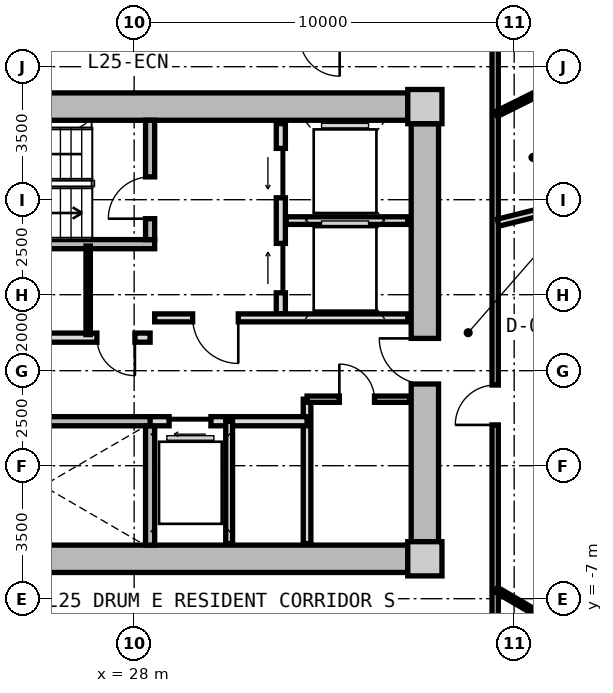
"""IFC4 building model, lengths in metres.
Left out: names, types, materials, properties, quantities, classifications, styles, units other than length and angle.
Written with IfcOpenShell. Run it as: python <this file> out.ifc"""

import sys

from ifc_helpers import new_model, si_unit, direction, frame, frame_2d, origin, origin_2d, place, context, subcontext, project, spatial, rectangle, extrude, source, transform, mapped, element, fill, save


model = new_model("IFC4")
c1 = context("Model", 3, precision=1e-05, world=origin(), true_north=direction((0.0, 1.0)))
c2 = subcontext(c1, "Body", "Model", "MODEL_VIEW")
j1 = project(units=[si_unit("LENGTHUNIT", "METRE"), si_unit("PLANEANGLEUNIT", "RADIAN")], contexts=[c1])
p1 = place(None, origin())
s1 = spatial("IfcSite", under=j1, at=p1, CompositionType="ELEMENT")
p2 = place(p1, origin())
s2 = spatial("IfcBuilding", under=s1, at=p2, CompositionType="ELEMENT")
p3 = place(p2, frame((0.0, 0.0, 84.05)))
s3 = spatial("IfcBuildingStorey", under=s2, at=p3, CompositionType="ELEMENT", Elevation=84.05)
m1 = source(origin(), c2, "Body", "SweptSolid", [
    extrude(rectangle(XDim=0.9, YDim=0.9, at=origin_2d()), origin(), (0.0, 0.0, 1.0), 3.05),
])
for number, where, z_axis, x_axis in (
    (1, (35.65, -5.95, 0.0), (0.0, 0.0, 1.0), (1.0, 0.0, 0.0)),
    (2, (35.65, 5.95, 0.0), (0.0, 0.0, 1.0), (1.0, 0.0, 0.0)),
):
    element("IfcColumn", number, at=place(p3, frame(where, z_axis=z_axis, x_axis=x_axis)), inside=s3, PredefinedType="COLUMN", context=c2, shape_type="MappedRepresentation", body=[
        mapped(m1, transform((0.0, 0.0, 0.0), x_axis=(1.0, 0.0, 0.0), y_axis=(0.0, 1.0, 0.0), z_axis=(0.0, 0.0, 1.0), scale=1.0)),
    ])
m2 = source(origin(), c2, "Body", "SweptSolid", [
    extrude(rectangle(XDim=14.4, YDim=0.72, at=frame_2d((7.2, 0.0))), origin(), (0.0, 0.0, 1.0), 2.79),
])
for number, where, z_axis, x_axis in (
    (3, (20.8, 5.95, 0.0), (0.0, 0.0, 1.0), (1.0, 0.0, 0.0)),
    (4, (35.2, -5.95, 0.0), (0.0, 0.0, 1.0), (-1.0, 0.0, 0.0)),
):
    element("IfcWall", number, at=place(p3, frame(where, z_axis=z_axis, x_axis=x_axis)), inside=s3, PredefinedType="SHEAR", context=c2, shape_type="MappedRepresentation", body=[
        mapped(m2, transform((0.0, 0.0, 0.0), x_axis=(1.0, 0.0, 0.0), y_axis=(0.0, 1.0, 0.0), z_axis=(0.0, 0.0, 1.0), scale=1.0)),
    ])
m3 = source(origin(), c2, "Body", "SweptSolid", [
    extrude(rectangle(XDim=11.0, YDim=0.72, at=frame_2d((5.5, 0.0))), origin(), (0.0, 0.0, 1.0), 2.79),
])
p4 = place(p3, frame((35.65, 5.5, 0.0), z_axis=(0.0, 0.0, 1.0), x_axis=(0.0, -1.0, 0.0)))
e5 = element("IfcWall", 5, at=p4, inside=s3, PredefinedType="SHEAR", context=c2, shape_type="MappedRepresentation", body=[
    mapped(m3, transform((0.0, 0.0, 0.0), x_axis=(1.0, 0.0, 0.0), y_axis=(0.0, 1.0, 0.0), z_axis=(0.0, 0.0, 1.0), scale=1.0)),
])
p5 = place(p4, frame((5.65, 0.0, 0.0)))
e6 = element("IfcOpeningElement", 6, at=p5, cuts=e5, PredefinedType="OPENING", context=c2, shape_type="SweptSolid", body=[
    extrude(rectangle(XDim=1.2, YDim=2.15, at=frame_2d((0.6, 1.075))), frame((0.0, 0.37, 0.0), z_axis=(0.0, -1.0, 0.0), x_axis=(1.0, 0.0, 0.0)), (0.0, 0.0, 1.0), 0.74),
])
m4 = source(origin(), c2, "Body", "SweptSolid", [
    extrude(rectangle(XDim=7.83, YDim=0.24, at=frame_2d((3.915, 0.0))), origin(), (0.0, 0.0, 1.0), 2.79),
])
p6 = place(p3, frame((20.71, 2.33, 0.0), z_axis=(0.0, 0.0, 1.0), x_axis=(1.0, 0.0, 0.0)))
e7 = element("IfcWall", 7, at=p6, inside=s3, PredefinedType="PARTITIONING", context=c2, shape_type="MappedRepresentation", body=[
    mapped(m4, transform((0.0, 0.0, 0.0), x_axis=(1.0, 0.0, 0.0), y_axis=(0.0, 1.0, 0.0), z_axis=(0.0, 0.0, 1.0), scale=1.0)),
])
m5 = source(origin(), c2, "Body", "SweptSolid", [
    extrude(rectangle(XDim=3.14, YDim=0.24, at=frame_2d((1.57, 0.0))), origin(), (0.0, 0.0, 1.0), 2.79),
])
p7 = place(p3, frame((28.42, 2.45, 0.0), z_axis=(0.0, 0.0, 1.0), x_axis=(0.0, 1.0, 0.0)))
e8 = element("IfcWall", 8, at=p7, inside=s3, PredefinedType="PARTITIONING", context=c2, shape_type="MappedRepresentation", body=[
    mapped(m5, transform((0.0, 0.0, 0.0), x_axis=(1.0, 0.0, 0.0), y_axis=(0.0, 1.0, 0.0), z_axis=(0.0, 0.0, 1.0), scale=1.0)),
])
p8 = place(p7, frame((0.55, 0.0, 0.0)))
e9 = element("IfcOpeningElement", 9, at=p8, cuts=e8, PredefinedType="OPENING", context=c2, shape_type="SweptSolid", body=[
    extrude(rectangle(XDim=1.1, YDim=2.15, at=frame_2d((0.55, 1.075))), frame((0.0, 0.13, 0.0), z_axis=(0.0, -1.0, 0.0), x_axis=(1.0, 0.0, 0.0)), (0.0, 0.0, 1.0), 0.26),
])
p9 = place(p3, frame((20.71, -2.33, 0.0), z_axis=(0.0, 0.0, 1.0), x_axis=(1.0, 0.0, 0.0)))
e10 = element("IfcWall", 10, at=p9, inside=s3, PredefinedType="PARTITIONING", context=c2, shape_type="MappedRepresentation", body=[
    mapped(m4, transform((0.0, 0.0, 0.0), x_axis=(1.0, 0.0, 0.0), y_axis=(0.0, 1.0, 0.0), z_axis=(0.0, 0.0, 1.0), scale=1.0)),
])
p10 = place(p9, frame((0.95, 0.0, 0.0)))
e11 = element("IfcOpeningElement", 11, at=p10, cuts=e10, PredefinedType="OPENING", context=c2, shape_type="SweptSolid", body=[
    extrude(rectangle(XDim=1.1, YDim=2.15, at=frame_2d((0.55, 1.075))), frame((0.0, 0.13, 0.0), z_axis=(0.0, -1.0, 0.0), x_axis=(1.0, 0.0, 0.0)), (0.0, 0.0, 1.0), 0.26),
])
p11 = place(p3, frame((28.42, -5.59, 0.0), z_axis=(0.0, 0.0, 1.0), x_axis=(0.0, 1.0, 0.0)))
e12 = element("IfcWall", 12, at=p11, inside=s3, PredefinedType="PARTITIONING", context=c2, shape_type="MappedRepresentation", body=[
    mapped(m5, transform((0.0, 0.0, 0.0), x_axis=(1.0, 0.0, 0.0), y_axis=(0.0, 1.0, 0.0), z_axis=(0.0, 0.0, 1.0), scale=1.0)),
])
m6 = source(origin(), c2, "Body", "SweptSolid", [
    extrude(rectangle(XDim=5.0, YDim=0.24, at=frame_2d((2.5, 0.0))), origin(), (0.0, 0.0, 1.0), 2.775),
])
p12 = place(p3, frame((31.86, 0.5, 0.0), z_axis=(0.0, 0.0, 1.0), x_axis=(0.0, 1.0, 0.0)))
e13 = element("IfcWall", 13, at=p12, inside=s3, PredefinedType="PARTITIONING", context=c2, shape_type="MappedRepresentation", body=[
    mapped(m6, transform((0.0, 0.0, 0.0), x_axis=(1.0, 0.0, 0.0), y_axis=(0.0, 1.0, 0.0), z_axis=(0.0, 0.0, 1.0), scale=1.0)),
])
p13 = place(p12, frame((3.05, 0.0, 0.0)))
e14 = element("IfcOpeningElement", 14, at=p13, cuts=e13, PredefinedType="OPENING", context=c2, shape_type="SweptSolid", body=[
    extrude(rectangle(XDim=1.3, YDim=2.2, at=frame_2d((0.65, 1.1))), frame((0.0, 0.13, 0.0), z_axis=(0.0, -1.0, 0.0), x_axis=(1.0, 0.0, 0.0)), (0.0, 0.0, 1.0), 0.26),
])
p14 = place(p12, frame((0.55, 0.0, 0.0)))
e15 = element("IfcOpeningElement", 15, at=p14, cuts=e13, PredefinedType="OPENING", context=c2, shape_type="SweptSolid", body=[
    extrude(rectangle(XDim=1.3, YDim=2.2, at=frame_2d((0.65, 1.1))), frame((0.0, 0.13, 0.0), z_axis=(0.0, -1.0, 0.0), x_axis=(1.0, 0.0, 0.0)), (0.0, 0.0, 1.0), 0.26),
])
m7 = source(origin(), c2, "Body", "SweptSolid", [
    extrude(rectangle(XDim=3.2, YDim=0.2, at=frame_2d((1.6, 0.0))), origin(), (0.0, 0.0, 1.0), 2.775),
])
p15 = place(p3, frame((32.0, 2.95, 0.0), z_axis=(0.0, 0.0, 1.0), x_axis=(1.0, 0.0, 0.0)))
e16 = element("IfcWall", 16, at=p15, inside=s3, PredefinedType="PARTITIONING", context=c2, shape_type="MappedRepresentation", body=[
    mapped(m7, transform((0.0, 0.0, 0.0), x_axis=(1.0, 0.0, 0.0), y_axis=(0.0, 1.0, 0.0), z_axis=(0.0, 0.0, 1.0), scale=1.0)),
])
m8 = source(origin(), c2, "Body", "SweptSolid", [
    extrude(rectangle(XDim=6.66, YDim=0.21, at=frame_2d((3.33, 0.0))), origin(), (0.0, 0.0, 1.0), 2.775),
])
p16 = place(p3, frame((28.54, 0.39, 0.0), z_axis=(0.0, 0.0, 1.0), x_axis=(1.0, 0.0, 0.0)))
e17 = element("IfcWall", 17, at=p16, inside=s3, PredefinedType="PARTITIONING", context=c2, shape_type="MappedRepresentation", body=[
    mapped(m8, transform((0.0, 0.0, 0.0), x_axis=(1.0, 0.0, 0.0), y_axis=(0.0, 1.0, 0.0), z_axis=(0.0, 0.0, 1.0), scale=1.0)),
])
p17 = place(p16, frame((1.0, 0.0, 0.0)))
e18 = element("IfcOpeningElement", 18, at=p17, cuts=e17, PredefinedType="OPENING", context=c2, shape_type="SweptSolid", body=[
    extrude(rectangle(XDim=1.2, YDim=2.15, at=frame_2d((0.6, 1.075))), frame((0.0, 0.115, 0.0), z_axis=(0.0, -1.0, 0.0), x_axis=(1.0, 0.0, 0.0)), (0.0, 0.0, 1.0), 0.23),
])
m9 = source(origin(), c2, "Body", "SweptSolid", [
    extrude(rectangle(XDim=7.62, YDim=0.24, at=frame_2d((3.81, 0.0))), origin(), (0.0, 0.0, 1.0), 2.775),
])
p18 = place(p3, frame((20.8, -0.13, 0.0), z_axis=(0.0, 0.0, 1.0), x_axis=(1.0, 0.0, 0.0)))
e19 = element("IfcWall", 19, at=p18, inside=s3, PredefinedType="PARTITIONING", context=c2, shape_type="MappedRepresentation", body=[
    mapped(m9, transform((0.0, 0.0, 0.0), x_axis=(1.0, 0.0, 0.0), y_axis=(0.0, 1.0, 0.0), z_axis=(0.0, 0.0, 1.0), scale=1.0)),
])
p19 = place(p18, frame((6.22, 0.0, 0.0)))
e20 = element("IfcOpeningElement", 20, at=p19, cuts=e19, PredefinedType="OPENING", context=c2, shape_type="SweptSolid", body=[
    extrude(rectangle(XDim=1.0, YDim=2.1, at=frame_2d((0.5, 1.05))), frame((0.0, 0.13, 0.0), z_axis=(0.0, -1.0, 0.0), x_axis=(1.0, 0.0, 0.0)), (0.0, 0.0, 1.0), 0.26),
])
p20 = place(p18, frame((2.4, 0.0, 0.0)))
e21 = element("IfcOpeningElement", 21, at=p20, cuts=e19, PredefinedType="OPENING", context=c2, shape_type="SweptSolid", body=[
    extrude(rectangle(XDim=1.0, YDim=2.1, at=frame_2d((0.5, 1.05))), frame((0.0, 0.13, 0.0), z_axis=(0.0, -1.0, 0.0), x_axis=(1.0, 0.0, 0.0)), (0.0, 0.0, 1.0), 0.26),
])
m10 = source(origin(), c2, "Body", "SweptSolid", [
    extrude(rectangle(XDim=2.33, YDim=0.115, at=frame_2d((1.165, 0.0))), origin(), (0.0, 0.0, 1.0), 2.775),
])
p21 = place(p3, frame((26.79, -0.05, 0.0), z_axis=(0.0, 0.0, 1.0), x_axis=(0.0, 1.0, 0.0)))
e22 = element("IfcWall", 22, at=p21, inside=s3, PredefinedType="PARTITIONING", context=c2, shape_type="MappedRepresentation", body=[
    mapped(m10, transform((0.0, 0.0, 0.0), x_axis=(1.0, 0.0, 0.0), y_axis=(0.0, 1.0, 0.0), z_axis=(0.0, 0.0, 1.0), scale=1.0)),
])
m11 = source(origin(), c2, "Body", "SweptSolid", [
    extrude(rectangle(XDim=3.8, YDim=0.2, at=frame_2d((1.9, 0.0))), origin(), (0.0, 0.0, 1.0), 2.775),
])
p22 = place(p3, frame((32.55, -5.55, 0.0), z_axis=(0.0, 0.0, 1.0), x_axis=(0.0, 1.0, 0.0)))
e23 = element("IfcWall", 23, at=p22, inside=s3, PredefinedType="PARTITIONING", context=c2, shape_type="MappedRepresentation", body=[
    mapped(m11, transform((0.0, 0.0, 0.0), x_axis=(1.0, 0.0, 0.0), y_axis=(0.0, 1.0, 0.0), z_axis=(0.0, 0.0, 1.0), scale=1.0)),
])
m12 = source(origin(), c2, "Body", "SweptSolid", [
    extrude(rectangle(XDim=4.13, YDim=0.24, at=frame_2d((2.065, 0.0))), origin(), (0.0, 0.0, 1.0), 2.775),
])
p23 = place(p3, frame((28.42, -2.33, 0.0), z_axis=(0.0, 0.0, 1.0), x_axis=(1.0, 0.0, 0.0)))
e24 = element("IfcWall", 24, at=p23, inside=s3, PredefinedType="PARTITIONING", context=c2, shape_type="MappedRepresentation", body=[
    mapped(m12, transform((0.0, 0.0, 0.0), x_axis=(1.0, 0.0, 0.0), y_axis=(0.0, 1.0, 0.0), z_axis=(0.0, 0.0, 1.0), scale=1.0)),
])
p24 = place(p23, frame((0.5, 0.0, 0.0)))
e25 = element("IfcOpeningElement", 25, at=p24, cuts=e24, PredefinedType="OPENING", context=c2, shape_type="SweptSolid", body=[
    extrude(rectangle(XDim=1.1, YDim=2.2, at=frame_2d((0.55, 1.1))), frame((0.0, 0.13, 0.0), z_axis=(0.0, -1.0, 0.0), x_axis=(1.0, 0.0, 0.0)), (0.0, 0.0, 1.0), 0.26),
])
m13 = source(origin(), c2, "Body", "SweptSolid", [
    extrude(rectangle(XDim=3.22, YDim=0.18, at=frame_2d((1.61, 0.0))), origin(), (0.0, 0.0, 1.0), 2.775),
])
p25 = place(p3, frame((30.5, -5.55, 0.0), z_axis=(0.0, 0.0, 1.0), x_axis=(0.0, 1.0, 0.0)))
e26 = element("IfcWall", 26, at=p25, inside=s3, PredefinedType="PARTITIONING", context=c2, shape_type="MappedRepresentation", body=[
    mapped(m13, transform((0.0, 0.0, 0.0), x_axis=(1.0, 0.0, 0.0), y_axis=(0.0, 1.0, 0.0), z_axis=(0.0, 0.0, 1.0), scale=1.0)),
])
m14 = source(origin(), c2, "Body", "SweptSolid", [
    extrude(rectangle(XDim=2.7, YDim=0.165, at=frame_2d((1.35, 0.0))), origin(), (0.0, 0.0, 1.0), 2.775),
])
p26 = place(p3, frame((32.55, -1.75, 0.0), z_axis=(0.0, 0.0, 1.0), x_axis=(1.0, 0.0, 0.0)))
e27 = element("IfcWall", 27, at=p26, inside=s3, PredefinedType="PARTITIONING", context=c2, shape_type="MappedRepresentation", body=[
    mapped(m14, transform((0.0, 0.0, 0.0), x_axis=(1.0, 0.0, 0.0), y_axis=(0.0, 1.0, 0.0), z_axis=(0.0, 0.0, 1.0), scale=1.0)),
])
p27 = place(p26, frame((0.85, 0.0, 0.0)))
e28 = element("IfcOpeningElement", 28, at=p27, cuts=e27, PredefinedType="OPENING", context=c2, shape_type="SweptSolid", body=[
    extrude(rectangle(XDim=0.925, YDim=2.1, at=frame_2d((0.462, 1.05))), frame((0.0, 0.093, 0.0), z_axis=(0.0, -1.0, 0.0), x_axis=(1.0, 0.0, 0.0)), (0.0, 0.0, 1.0), 0.185),
])
m15 = source(origin(), c2, "Body", "SweptSolid", [
    extrude(rectangle(XDim=15.6, YDim=0.165, at=frame_2d((7.8, 0.0))), origin(), (0.0, 0.0, 1.0), 2.775),
])
p28 = place(p3, frame((37.5, 7.8, 0.0), z_axis=(0.0, 0.0, 1.0), x_axis=(0.0, -1.0, 0.0)))
e29 = element("IfcWall", 29, at=p28, inside=s3, PredefinedType="PARTITIONING", context=c2, shape_type="MappedRepresentation", body=[
    mapped(m15, transform((0.0, 0.0, 0.0), x_axis=(1.0, 0.0, 0.0), y_axis=(0.0, 1.0, 0.0), z_axis=(0.0, 0.0, 1.0), scale=1.0)),
])
p29 = place(p28, frame((9.177, 0.0, 0.0)))
e30 = element("IfcOpeningElement", 30, at=p29, cuts=e29, PredefinedType="OPENING", context=c2, shape_type="SweptSolid", body=[
    extrude(rectangle(XDim=1.05, YDim=2.15, at=frame_2d((0.525, 1.075))), frame((0.0, 0.093, 0.0), z_axis=(0.0, -1.0, 0.0), x_axis=(1.0, 0.0, 0.0)), (0.0, 0.0, 1.0), 0.185),
])
m16 = source(origin(), c2, "Body", "SweptSolid", [
    extrude(rectangle(XDim=6.331, YDim=0.19, at=frame_2d((3.165, 0.0))), origin(), (0.0, 0.0, 1.0), 2.275),
])
p30 = place(p3, frame((37.58, 2.896, 0.0), z_axis=(0.0, 0.0, 1.0), x_axis=(0.97036440661, 0.241646267062, 0.0)))
e31 = element("IfcWall", 31, at=p30, inside=s3, PredefinedType="PARTITIONING", context=c2, shape_type="MappedRepresentation", body=[
    mapped(m16, transform((0.0, 0.0, 0.0), x_axis=(1.0, 0.0, 0.0), y_axis=(0.0, 1.0, 0.0), z_axis=(0.0, 0.0, 1.0), scale=1.0)),
])
m17 = source(origin(), c2, "Body", "SweptSolid", [
    extrude(rectangle(XDim=1.407, YDim=0.14, at=frame_2d((0.704, 0.0))), origin(), (0.0, 0.0, 1.0), 2.775),
])
p31 = place(p3, frame((37.53, -6.762, 0.0), z_axis=(0.0, 0.0, 1.0), x_axis=(0.863539718977, -0.504280828258, 0.0)))
e32 = element("IfcWall", 32, at=p31, inside=s3, PredefinedType="PARTITIONING", context=c2, shape_type="MappedRepresentation", body=[
    mapped(m17, transform((0.0, 0.0, 0.0), x_axis=(1.0, 0.0, 0.0), y_axis=(0.0, 1.0, 0.0), z_axis=(0.0, 0.0, 1.0), scale=1.0)),
])
m18 = source(origin(), c2, "Body", "SweptSolid", [
    extrude(rectangle(XDim=1.6, YDim=0.14, at=frame_2d((0.8, 0.0))), origin(), (0.0, 0.0, 1.0), 2.775),
])
p32 = place(p3, frame((37.53, 5.754, 0.0), z_axis=(0.0, 0.0, 1.0), x_axis=(0.895522919837, 0.445015393044, 0.0)))
e33 = element("IfcWall", 33, at=p32, inside=s3, PredefinedType="PARTITIONING", context=c2, shape_type="MappedRepresentation", body=[
    mapped(m18, transform((0.0, 0.0, 0.0), x_axis=(1.0, 0.0, 0.0), y_axis=(0.0, 1.0, 0.0), z_axis=(0.0, 0.0, 1.0), scale=1.0)),
])
m19 = source(origin(), c2, "Body", "SweptSolid", [
    extrude(rectangle(XDim=3.902, YDim=0.115, at=frame_2d((1.951, 0.0))), origin(), (0.0, 0.0, 1.0), 2.775),
])
p33 = place(p3, frame((39.46, 7.289, 0.0), z_axis=(0.0, 0.0, 1.0), x_axis=(-0.714853061854, 0.699274695637, 0.0)))
e34 = element("IfcWall", 34, at=p33, inside=s3, PredefinedType="PARTITIONING", context=c2, shape_type="MappedRepresentation", body=[
    mapped(m19, transform((0.0, 0.0, 0.0), x_axis=(1.0, 0.0, 0.0), y_axis=(0.0, 1.0, 0.0), z_axis=(0.0, 0.0, 1.0), scale=1.0)),
])
p34 = place(p33, frame((1.476, 0.0, 0.0)))
e35 = element("IfcOpeningElement", 35, at=p34, cuts=e34, PredefinedType="OPENING", context=c2, shape_type="SweptSolid", body=[
    extrude(rectangle(XDim=0.95, YDim=2.1, at=frame_2d((0.475, 1.05))), frame((0.0, 0.067, 0.0), z_axis=(0.0, -1.0, 0.0), x_axis=(1.0, 0.0, 0.0)), (0.0, 0.0, 1.0), 0.135),
])
m20 = source(origin(), c2, "Body", "SweptSolid", [
    extrude(rectangle(XDim=1.1, YDim=2.15, at=frame_2d((0.55, 1.075))), frame((0.0, 0.025, 0.0), z_axis=(0.0, -1.0, 0.0), x_axis=(1.0, 0.0, 0.0)), (0.0, 0.0, 1.0), 0.05),
])
p35 = place(p8, origin())
e36 = element("IfcDoor", 36, at=p35, inside=s3, OperationType="SINGLE_SWING_LEFT", PredefinedType="DOOR", context=c2, shape_type="MappedRepresentation", body=[
    mapped(m20, transform((0.0, 0.0, 0.0), x_axis=(1.0, 0.0, 0.0), y_axis=(0.0, 1.0, 0.0), z_axis=(0.0, 0.0, 1.0), scale=1.0)),
])
fill(e9, e36)
m21 = source(origin(), c2, "Body", "SweptSolid", [
    extrude(rectangle(XDim=1.3, YDim=2.2, at=frame_2d((0.65, 1.1))), frame((0.0, 0.025, 0.0), z_axis=(0.0, -1.0, 0.0), x_axis=(1.0, 0.0, 0.0)), (0.0, 0.0, 1.0), 0.05),
])
p36 = place(p13, origin())
e37 = element("IfcDoor", 37, at=p36, inside=s3, OperationType="SLIDING_TO_LEFT", PredefinedType="DOOR", context=c2, shape_type="MappedRepresentation", body=[
    mapped(m21, transform((0.0, 0.0, 0.0), x_axis=(1.0, 0.0, 0.0), y_axis=(0.0, 1.0, 0.0), z_axis=(0.0, 0.0, 1.0), scale=1.0)),
])
fill(e14, e37)
p37 = place(p14, origin())
e38 = element("IfcDoor", 38, at=p37, inside=s3, OperationType="SLIDING_TO_RIGHT", PredefinedType="DOOR", context=c2, shape_type="MappedRepresentation", body=[
    mapped(m21, transform((0.0, 0.0, 0.0), x_axis=(1.0, 0.0, 0.0), y_axis=(0.0, 1.0, 0.0), z_axis=(0.0, 0.0, 1.0), scale=1.0)),
])
fill(e15, e38)
m22 = source(origin(), c2, "Body", "SweptSolid", [
    extrude(rectangle(XDim=1.2, YDim=2.15, at=frame_2d((0.6, 1.075))), frame((0.0, 0.025, 0.0), z_axis=(0.0, -1.0, 0.0), x_axis=(1.0, 0.0, 0.0)), (0.0, 0.0, 1.0), 0.05),
])
p38 = place(p17, frame((1.2, 0.0, 0.0), z_axis=(0.0, 0.0, 1.0), x_axis=(-1.0, 0.0, 0.0)))
e39 = element("IfcDoor", 39, at=p38, inside=s3, OperationType="SINGLE_SWING_LEFT", PredefinedType="DOOR", context=c2, shape_type="MappedRepresentation", body=[
    mapped(m22, transform((0.0, 0.0, 0.0), x_axis=(1.0, 0.0, 0.0), y_axis=(0.0, 1.0, 0.0), z_axis=(0.0, 0.0, 1.0), scale=1.0)),
])
fill(e18, e39)
p39 = place(p5, frame((1.2, 0.0, 0.0), z_axis=(0.0, 0.0, 1.0), x_axis=(-1.0, 0.0, 0.0)))
e40 = element("IfcDoor", 40, at=p39, inside=s3, OperationType="SINGLE_SWING_RIGHT", PredefinedType="DOOR", context=c2, shape_type="MappedRepresentation", body=[
    mapped(m22, transform((0.0, 0.0, 0.0), x_axis=(1.0, 0.0, 0.0), y_axis=(0.0, 1.0, 0.0), z_axis=(0.0, 0.0, 1.0), scale=1.0)),
])
fill(e6, e40)
m23 = source(origin(), c2, "Body", "SweptSolid", [
    extrude(rectangle(XDim=1.0, YDim=2.1, at=frame_2d((0.5, 1.05))), frame((0.0, 0.025, 0.0), z_axis=(0.0, -1.0, 0.0), x_axis=(1.0, 0.0, 0.0)), (0.0, 0.0, 1.0), 0.05),
])
p40 = place(p19, frame((1.0, 0.0, 0.0), z_axis=(0.0, 0.0, 1.0), x_axis=(-1.0, 0.0, 0.0)))
e41 = element("IfcDoor", 41, at=p40, inside=s3, OperationType="SINGLE_SWING_LEFT", PredefinedType="DOOR", context=c2, shape_type="MappedRepresentation", body=[
    mapped(m23, transform((0.0, 0.0, 0.0), x_axis=(1.0, 0.0, 0.0), y_axis=(0.0, 1.0, 0.0), z_axis=(0.0, 0.0, 1.0), scale=1.0)),
])
fill(e20, e41)
m24 = source(origin(), c2, "Body", "SweptSolid", [
    extrude(rectangle(XDim=1.1, YDim=2.2, at=frame_2d((0.55, 1.1))), frame((0.0, 0.025, 0.0), z_axis=(0.0, -1.0, 0.0), x_axis=(1.0, 0.0, 0.0)), (0.0, 0.0, 1.0), 0.05),
])
p41 = place(p24, frame((1.1, 0.0, 0.0), z_axis=(0.0, 0.0, 1.0), x_axis=(-1.0, 0.0, 0.0)))
e42 = element("IfcDoor", 42, at=p41, inside=s3, OperationType="SLIDING_TO_LEFT", PredefinedType="DOOR", context=c2, shape_type="MappedRepresentation", body=[
    mapped(m24, transform((0.0, 0.0, 0.0), x_axis=(1.0, 0.0, 0.0), y_axis=(0.0, 1.0, 0.0), z_axis=(0.0, 0.0, 1.0), scale=1.0)),
])
fill(e25, e42)
m25 = source(origin(), c2, "Body", "SweptSolid", [
    extrude(rectangle(XDim=0.925, YDim=2.1, at=frame_2d((0.462, 1.05))), frame((0.0, 0.025, 0.0), z_axis=(0.0, -1.0, 0.0), x_axis=(1.0, 0.0, 0.0)), (0.0, 0.0, 1.0), 0.05),
])
p42 = place(p27, origin())
e43 = element("IfcDoor", 43, at=p42, inside=s3, OperationType="SINGLE_SWING_LEFT", PredefinedType="DOOR", context=c2, shape_type="MappedRepresentation", body=[
    mapped(m25, transform((0.0, 0.0, 0.0), x_axis=(1.0, 0.0, 0.0), y_axis=(0.0, 1.0, 0.0), z_axis=(0.0, 0.0, 1.0), scale=1.0)),
])
fill(e28, e43)
m26 = source(origin(), c2, "Body", "SweptSolid", [
    extrude(rectangle(XDim=1.05, YDim=2.15, at=frame_2d((0.525, 1.075))), frame((0.0, 0.025, 0.0), z_axis=(0.0, -1.0, 0.0), x_axis=(1.0, 0.0, 0.0)), (0.0, 0.0, 1.0), 0.05),
])
p43 = place(p29, frame((1.05, 0.0, 0.0), z_axis=(0.0, 0.0, 1.0), x_axis=(-1.0, 0.0, 0.0)))
e44 = element("IfcDoor", 44, at=p43, inside=s3, OperationType="SINGLE_SWING_LEFT", PredefinedType="DOOR", context=c2, shape_type="MappedRepresentation", body=[
    mapped(m26, transform((0.0, 0.0, 0.0), x_axis=(1.0, 0.0, 0.0), y_axis=(0.0, 1.0, 0.0), z_axis=(0.0, 0.0, 1.0), scale=1.0)),
])
fill(e30, e44)
save(model, sys.argv[1])
